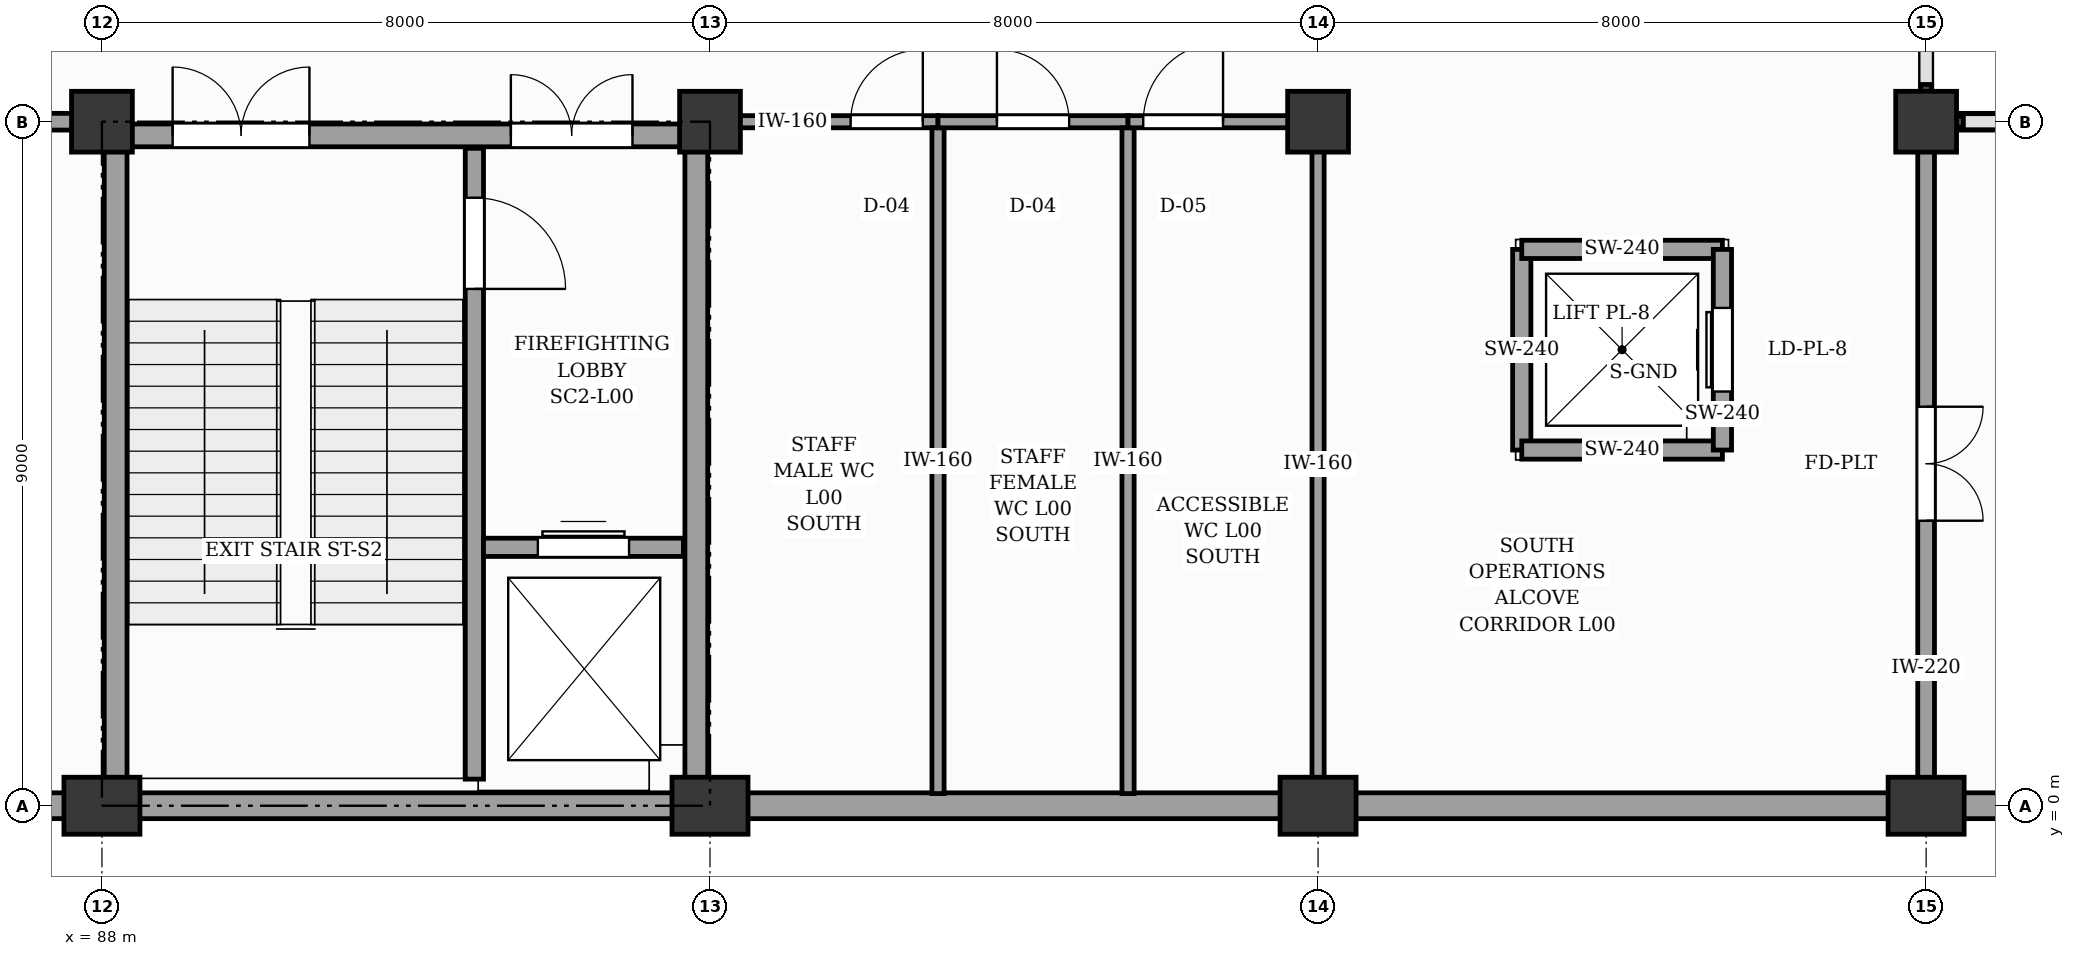
"""IFC4 building model, lengths in metres.
Left out: names, types, materials, properties, quantities, classifications, styles, units other than length and angle.
Written with IfcOpenShell. Run it as: python <this file> out.ifc"""

import sys

from ifc_helpers import new_model, si_unit, direction, frame, frame_2d, origin, origin_2d, place, context, subcontext, project, spatial, rectangle, extrude, element, fill, save


model = new_model("IFC4")
c1 = context("Model", 3, precision=1e-05, world=origin(), true_north=direction((0.0, 1.0)))
c2 = subcontext(c1, "Body", "Model", "MODEL_VIEW")
j1 = project(units=[si_unit("LENGTHUNIT", "METRE"), si_unit("PLANEANGLEUNIT", "RADIAN")], contexts=[c1])
p1 = place(None, origin())
s1 = spatial("IfcSite", under=j1, at=p1, CompositionType="ELEMENT")
p2 = place(p1, origin())
s2 = spatial("IfcBuilding", under=s1, at=p2, CompositionType="ELEMENT")
p3 = place(p2, origin())
s3 = spatial("IfcBuildingStorey", under=s2, at=p3, CompositionType="ELEMENT", Elevation=0.0)
p4 = place(p3, frame((88.0, 0.0, -0.3), z_axis=(0.0, 0.0, 1.0), x_axis=(1.0, 0.0, 0.0)))
e1 = element("IfcColumn", 1, at=p4, inside=s3, PredefinedType="PILASTER", context=c2, shape_type="SweptSolid", body=[
    extrude(rectangle(XDim=1.0, YDim=0.75, at=origin_2d()), origin(), (0.0, 0.0, 1.0), 5.1),
])
p5 = place(p3, frame((88.0, 9.0, -0.3), z_axis=(0.0, 0.0, 1.0), x_axis=(1.0, 0.0, 0.0)))
e2 = element("IfcColumn", 2, at=p5, inside=s3, PredefinedType="COLUMN", context=c2, shape_type="SweptSolid", body=[
    extrude(rectangle(XDim=0.8, YDim=0.8, at=origin_2d()), origin(), (0.0, 0.0, 1.0), 5.1),
])
p6 = place(p3, frame((96.0, 0.0, -0.3), z_axis=(0.0, 0.0, 1.0), x_axis=(1.0, 0.0, 0.0)))
e3 = element("IfcColumn", 3, at=p6, inside=s3, PredefinedType="PILASTER", context=c2, shape_type="SweptSolid", body=[
    extrude(rectangle(XDim=1.0, YDim=0.75, at=origin_2d()), origin(), (0.0, 0.0, 1.0), 5.1),
])
p7 = place(p3, frame((96.0, 9.0, -0.3), z_axis=(0.0, 0.0, 1.0), x_axis=(1.0, 0.0, 0.0)))
e4 = element("IfcColumn", 4, at=p7, inside=s3, PredefinedType="COLUMN", context=c2, shape_type="SweptSolid", body=[
    extrude(rectangle(XDim=0.8, YDim=0.8, at=origin_2d()), origin(), (0.0, 0.0, 1.0), 5.1),
])
p8 = place(p3, frame((104.0, 0.0, -0.3), z_axis=(0.0, 0.0, 1.0), x_axis=(1.0, 0.0, 0.0)))
e5 = element("IfcColumn", 5, at=p8, inside=s3, PredefinedType="PILASTER", context=c2, shape_type="SweptSolid", body=[
    extrude(rectangle(XDim=1.0, YDim=0.75, at=origin_2d()), origin(), (0.0, 0.0, 1.0), 5.1),
])
p9 = place(p3, frame((104.0, 9.0, -0.3), z_axis=(0.0, 0.0, 1.0), x_axis=(1.0, 0.0, 0.0)))
e6 = element("IfcColumn", 6, at=p9, inside=s3, PredefinedType="COLUMN", context=c2, shape_type="SweptSolid", body=[
    extrude(rectangle(XDim=0.8, YDim=0.8, at=origin_2d()), origin(), (0.0, 0.0, 1.0), 5.1),
])
p10 = place(p3, frame((112.0, 0.0, -0.3), z_axis=(0.0, 0.0, 1.0), x_axis=(1.0, 0.0, 0.0)))
e7 = element("IfcColumn", 7, at=p10, inside=s3, PredefinedType="PILASTER", context=c2, shape_type="SweptSolid", body=[
    extrude(rectangle(XDim=1.0, YDim=0.75, at=origin_2d()), origin(), (0.0, 0.0, 1.0), 5.1),
])
p11 = place(p3, frame((112.0, 9.0, -0.3), z_axis=(0.0, 0.0, 1.0), x_axis=(1.0, 0.0, 0.0)))
e8 = element("IfcColumn", 8, at=p11, inside=s3, PredefinedType="COLUMN", context=c2, shape_type="SweptSolid", body=[
    extrude(rectangle(XDim=0.8, YDim=0.8, at=origin_2d()), origin(), (0.0, 0.0, 1.0), 5.1),
])
for number, where, z_axis, x_axis in (
    (9, (80.4, 0.0, 0.0), (0.0, 0.0, 1.0), (1.0, 0.0, 0.0)),
    (10, (88.4, 0.0, 0.0), (0.0, 0.0, 1.0), (1.0, 0.0, 0.0)),
    (11, (96.4, 0.0, 0.0), (0.0, 0.0, 1.0), (1.0, 0.0, 0.0)),
    (12, (104.4, 0.0, 0.0), (0.0, 0.0, 1.0), (1.0, 0.0, 0.0)),
):
    element("IfcWall", number, at=place(p3, frame(where, z_axis=z_axis, x_axis=x_axis)), inside=s3, PredefinedType="SOLIDWALL", context=c2, shape_type="SweptSolid", body=[
        extrude(rectangle(XDim=7.2, YDim=0.34, at=frame_2d((3.6, 0.0))), origin(), (0.0, 0.0, 1.0), 3.81),
    ])
p12 = place(p3, frame((112.4, 0.0, 0.0), z_axis=(0.0, 0.0, 1.0), x_axis=(1.0, 0.0, 0.0)))
e13 = element("IfcWall", 13, at=p12, inside=s3, PredefinedType="SOLIDWALL", context=c2, shape_type="SweptSolid", body=[
    extrude(rectangle(XDim=7.2, YDim=0.34, at=frame_2d((3.6, 0.0))), origin(), (0.0, 0.0, 1.0), 3.03),
])
p13 = place(p3, frame((92.9, 0.35, 0.0), z_axis=(0.0, 0.0, 1.0), x_axis=(0.0, 1.0, 0.0)))
e14 = element("IfcWall", 14, at=p13, inside=s3, PredefinedType="SHEAR", context=c2, shape_type="SweptSolid", body=[
    extrude(rectangle(XDim=8.3, YDim=0.24, at=frame_2d((4.15, 0.0))), origin(), (0.0, 0.0, 1.0), 4.52),
])
p14 = place(p13, frame((6.45, 0.0, 0.0)))
e15 = element("IfcOpeningElement", 15, at=p14, cuts=e14, PredefinedType="OPENING", context=c2, shape_type="SweptSolid", body=[
    extrude(rectangle(XDim=1.2, YDim=2.15, at=frame_2d((0.6, 1.075))), frame((0.0, 0.13, 0.0), z_axis=(0.0, -1.0, 0.0), x_axis=(1.0, 0.0, 0.0)), (0.0, 0.0, 1.0), 0.26),
])
p15 = place(p3, frame((93.02, 3.4, 0.0), z_axis=(0.0, 0.0, 1.0), x_axis=(1.0, 0.0, 0.0)))
e16 = element("IfcWall", 16, at=p15, inside=s3, PredefinedType="SHEAR", context=c2, shape_type="SweptSolid", body=[
    extrude(rectangle(XDim=2.63, YDim=0.24, at=frame_2d((1.315, 0.0))), origin(), (0.0, 0.0, 1.0), 4.52),
])
p16 = place(p15, frame((0.715, 0.0, 0.0)))
e17 = element("IfcOpeningElement", 17, at=p16, cuts=e16, PredefinedType="OPENING", context=c2, shape_type="SweptSolid", body=[
    extrude(rectangle(XDim=1.2, YDim=2.15, at=frame_2d((0.6, 1.075))), frame((0.0, 0.13, 0.0), z_axis=(0.0, -1.0, 0.0), x_axis=(1.0, 0.0, 0.0)), (0.0, 0.0, 1.0), 0.26),
])
for number, where, z_axis, x_axis in (
    (18, (88.18, 0.18, 0.0), (0.0, 0.0, 1.0), (0.0, 1.0, 0.0)),
    (19, (95.82, 0.18, 0.0), (0.0, 0.0, 1.0), (0.0, 1.0, 0.0)),
):
    element("IfcWall", number, at=place(p3, frame(where, z_axis=z_axis, x_axis=x_axis)), inside=s3, PredefinedType="SHEAR", context=c2, shape_type="SweptSolid", body=[
        extrude(rectangle(XDim=8.64, YDim=0.3, at=frame_2d((4.32, 0.0))), origin(), (0.0, 0.0, 1.0), 4.52),
    ])
p17 = place(p3, frame((88.03, 8.82, 0.0), z_axis=(0.0, 0.0, 1.0), x_axis=(1.0, 0.0, 0.0)))
e20 = element("IfcWall", 20, at=p17, inside=s3, PredefinedType="SHEAR", context=c2, shape_type="SweptSolid", body=[
    extrude(rectangle(XDim=7.94, YDim=0.3, at=frame_2d((3.97, 0.0))), origin(), (0.0, 0.0, 1.0), 4.52),
])
p18 = place(p17, frame((5.35, 0.0, 0.0)))
e21 = element("IfcOpeningElement", 21, at=p18, cuts=e20, PredefinedType="OPENING", context=c2, shape_type="SweptSolid", body=[
    extrude(rectangle(XDim=1.6, YDim=2.15, at=frame_2d((0.8, 1.075))), frame((0.0, 0.16, 0.0), z_axis=(0.0, -1.0, 0.0), x_axis=(1.0, 0.0, 0.0)), (0.0, 0.0, 1.0), 0.32),
])
p19 = place(p17, frame((0.9, 0.0, 0.0)))
e22 = element("IfcOpeningElement", 22, at=p19, cuts=e20, PredefinedType="OPENING", context=c2, shape_type="SweptSolid", body=[
    extrude(rectangle(XDim=1.8, YDim=2.2, at=frame_2d((0.9, 1.1))), frame((0.0, 0.16, 0.0), z_axis=(0.0, -1.0, 0.0), x_axis=(1.0, 0.0, 0.0)), (0.0, 0.0, 1.0), 0.32),
])
for number, where, z_axis, x_axis in (
    (23, (106.68, 4.68, 0.0), (0.0, 0.0, 1.0), (0.0, 1.0, 0.0)),
    (24, (106.68, 4.68, 0.0), (0.0, 0.0, 1.0), (1.0, 0.0, 0.0)),
    (25, (106.68, 7.32, 0.0), (0.0, 0.0, 1.0), (1.0, 0.0, 0.0)),
):
    element("IfcWall", number, at=place(p3, frame(where, z_axis=z_axis, x_axis=x_axis)), inside=s3, PredefinedType="SHEAR", context=c2, shape_type="SweptSolid", body=[
        extrude(rectangle(XDim=2.64, YDim=0.24, at=frame_2d((1.32, 0.0))), origin(), (0.0, 0.0, 1.0), 4.55),
    ])
p20 = place(p3, frame((109.32, 4.68, 0.0), z_axis=(0.0, 0.0, 1.0), x_axis=(0.0, 1.0, 0.0)))
e26 = element("IfcWall", 26, at=p20, inside=s3, PredefinedType="SHEAR", context=c2, shape_type="SweptSolid", body=[
    extrude(rectangle(XDim=2.64, YDim=0.24, at=frame_2d((1.32, 0.0))), origin(), (0.0, 0.0, 1.0), 4.55),
])
p21 = place(p20, frame((0.77, 0.0, 0.0)))
e27 = element("IfcOpeningElement", 27, at=p21, cuts=e26, PredefinedType="OPENING", context=c2, shape_type="SweptSolid", body=[
    extrude(rectangle(XDim=1.1, YDim=2.15, at=frame_2d((0.55, 1.075))), frame((0.0, 0.13, 0.0), z_axis=(0.0, -1.0, 0.0), x_axis=(1.0, 0.0, 0.0)), (0.0, 0.0, 1.0), 0.26),
])
p22 = place(p3, frame((80.3, 9.0, 0.0), z_axis=(0.0, 0.0, 1.0), x_axis=(1.0, 0.0, 0.0)))
e28 = element("IfcWall", 28, at=p22, inside=s3, PredefinedType="SOLIDWALL", context=c2, shape_type="SweptSolid", body=[
    extrude(rectangle(XDim=7.4, YDim=0.22, at=frame_2d((3.7, 0.0))), origin(), (0.0, 0.0, 1.0), 3.56),
])
p23 = place(p22, frame((2.95, 0.0, 0.0)))
e29 = element("IfcOpeningElement", 29, at=p23, cuts=e28, PredefinedType="OPENING", context=c2, shape_type="SweptSolid", body=[
    extrude(rectangle(XDim=1.5, YDim=2.2, at=frame_2d((0.75, 1.1))), frame((0.0, 0.12, 0.0), z_axis=(0.0, -1.0, 0.0), x_axis=(1.0, 0.0, 0.0)), (0.0, 0.0, 1.0), 0.24),
])
p24 = place(p3, frame((96.3, 9.0, 0.0), z_axis=(0.0, 0.0, 1.0), x_axis=(1.0, 0.0, 0.0)))
e30 = element("IfcWall", 30, at=p24, inside=s3, PredefinedType="PARTITIONING", context=c2, shape_type="SweptSolid", body=[
    extrude(rectangle(XDim=2.7, YDim=0.16, at=frame_2d((1.35, 0.0))), origin(), (0.0, 0.0, 1.0), 3.56),
])
p25 = place(p24, frame((1.55, 0.0, 0.0)))
e31 = element("IfcOpeningElement", 31, at=p25, cuts=e30, PredefinedType="OPENING", context=c2, shape_type="SweptSolid", body=[
    extrude(rectangle(XDim=0.95, YDim=2.1, at=frame_2d((0.475, 1.05))), frame((0.0, 0.09, 0.0), z_axis=(0.0, -1.0, 0.0), x_axis=(1.0, 0.0, 0.0)), (0.0, 0.0, 1.0), 0.18),
])
p26 = place(p3, frame((99.0, 0.16, 0.0), z_axis=(0.0, 0.0, 1.0), x_axis=(0.0, 1.0, 0.0)))
e32 = element("IfcWall", 32, at=p26, inside=s3, PredefinedType="PARTITIONING", context=c2, shape_type="SweptSolid", body=[
    extrude(rectangle(XDim=8.76, YDim=0.16, at=frame_2d((4.38, 0.0))), origin(), (0.0, 0.0, 1.0), 3.56),
])
p27 = place(p3, frame((99.0, 9.0, 0.0), z_axis=(0.0, 0.0, 1.0), x_axis=(1.0, 0.0, 0.0)))
e33 = element("IfcWall", 33, at=p27, inside=s3, PredefinedType="PARTITIONING", context=c2, shape_type="SweptSolid", body=[
    extrude(rectangle(XDim=2.5, YDim=0.16, at=frame_2d((1.25, 0.0))), origin(), (0.0, 0.0, 1.0), 3.56),
])
p28 = place(p27, frame((0.775, 0.0, 0.0)))
e34 = element("IfcOpeningElement", 34, at=p28, cuts=e33, PredefinedType="OPENING", context=c2, shape_type="SweptSolid", body=[
    extrude(rectangle(XDim=0.95, YDim=2.1, at=frame_2d((0.475, 1.05))), frame((0.0, 0.09, 0.0), z_axis=(0.0, -1.0, 0.0), x_axis=(1.0, 0.0, 0.0)), (0.0, 0.0, 1.0), 0.18),
])
p29 = place(p3, frame((101.5, 0.16, 0.0), z_axis=(0.0, 0.0, 1.0), x_axis=(0.0, 1.0, 0.0)))
e35 = element("IfcWall", 35, at=p29, inside=s3, PredefinedType="PARTITIONING", context=c2, shape_type="SweptSolid", body=[
    extrude(rectangle(XDim=8.76, YDim=0.16, at=frame_2d((4.38, 0.0))), origin(), (0.0, 0.0, 1.0), 3.56),
])
p30 = place(p3, frame((101.5, 9.0, 0.0), z_axis=(0.0, 0.0, 1.0), x_axis=(1.0, 0.0, 0.0)))
e36 = element("IfcWall", 36, at=p30, inside=s3, PredefinedType="PARTITIONING", context=c2, shape_type="SweptSolid", body=[
    extrude(rectangle(XDim=2.2, YDim=0.16, at=frame_2d((1.1, 0.0))), origin(), (0.0, 0.0, 1.0), 3.56),
])
p31 = place(p30, frame((0.2, 0.0, 0.0)))
e37 = element("IfcOpeningElement", 37, at=p31, cuts=e36, PredefinedType="OPENING", context=c2, shape_type="SweptSolid", body=[
    extrude(rectangle(XDim=1.05, YDim=2.1, at=frame_2d((0.525, 1.05))), frame((0.0, 0.09, 0.0), z_axis=(0.0, -1.0, 0.0), x_axis=(1.0, 0.0, 0.0)), (0.0, 0.0, 1.0), 0.18),
])
p32 = place(p3, frame((104.0, 0.3, 0.0), z_axis=(0.0, 0.0, 1.0), x_axis=(0.0, 1.0, 0.0)))
e38 = element("IfcWall", 38, at=p32, inside=s3, PredefinedType="PARTITIONING", context=c2, shape_type="SweptSolid", body=[
    extrude(rectangle(XDim=8.4, YDim=0.16, at=frame_2d((4.2, 0.0))), origin(), (0.0, 0.0, 1.0), 3.56),
])
p33 = place(p3, frame((112.3, 9.0, 0.0), z_axis=(0.0, 0.0, 1.0), x_axis=(1.0, 0.0, 0.0)))
e39 = element("IfcWall", 39, at=p33, inside=s3, PredefinedType="SOLIDWALL", context=c2, shape_type="SweptSolid", body=[
    extrude(rectangle(XDim=7.4, YDim=0.22, at=frame_2d((3.7, 0.0))), origin(), (0.0, 0.0, 1.0), 2.73),
])
p34 = place(p33, frame((2.95, 0.0, 0.0)))
e40 = element("IfcOpeningElement", 40, at=p34, cuts=e39, PredefinedType="OPENING", context=c2, shape_type="SweptSolid", body=[
    extrude(rectangle(XDim=1.5, YDim=2.2, at=frame_2d((0.75, 1.1))), frame((0.0, 0.12, 0.0), z_axis=(0.0, -1.0, 0.0), x_axis=(1.0, 0.0, 0.0)), (0.0, 0.0, 1.0), 0.24),
])
p35 = place(p3, frame((112.0, 0.3, 0.0), z_axis=(0.0, 0.0, 1.0), x_axis=(0.0, 1.0, 0.0)))
e41 = element("IfcWall", 41, at=p35, inside=s3, PredefinedType="SOLIDWALL", context=c2, shape_type="SweptSolid", body=[
    extrude(rectangle(XDim=8.4, YDim=0.22, at=frame_2d((4.2, 0.0))), origin(), (0.0, 0.0, 1.0), 3.56),
])
p36 = place(p35, frame((3.45, 0.0, 0.0)))
e42 = element("IfcOpeningElement", 42, at=p36, cuts=e41, PredefinedType="OPENING", context=c2, shape_type="SweptSolid", body=[
    extrude(rectangle(XDim=1.5, YDim=2.2, at=frame_2d((0.75, 1.1))), frame((0.0, 0.12, 0.0), z_axis=(0.0, -1.0, 0.0), x_axis=(1.0, 0.0, 0.0)), (0.0, 0.0, 1.0), 0.24),
])
p37 = place(p14, frame((1.2, 0.0, 0.0), z_axis=(0.0, 0.0, 1.0), x_axis=(-1.0, 0.0, 0.0)))
e43 = element("IfcDoor", 43, at=p37, inside=s3, OperationType="SINGLE_SWING_LEFT", PredefinedType="DOOR", context=c2, shape_type="SweptSolid", body=[
    extrude(rectangle(XDim=1.2, YDim=2.15, at=frame_2d((0.6, 1.075))), frame((0.0, 0.025, 0.0), z_axis=(0.0, -1.0, 0.0), x_axis=(1.0, 0.0, 0.0)), (0.0, 0.0, 1.0), 0.05),
])
fill(e15, e43)
p38 = place(p16, origin())
e44 = element("IfcDoor", 44, at=p38, inside=s3, OperationType="DOUBLE_DOOR_SLIDING", PredefinedType="DOOR", context=c2, shape_type="SweptSolid", body=[
    extrude(rectangle(XDim=1.2, YDim=2.15, at=frame_2d((0.6, 1.075))), frame((0.0, 0.025, 0.0), z_axis=(0.0, -1.0, 0.0), x_axis=(1.0, 0.0, 0.0)), (0.0, 0.0, 1.0), 0.05),
])
fill(e17, e44)
p39 = place(p18, origin())
e45 = element("IfcDoor", 45, at=p39, inside=s3, OperationType="DOUBLE_DOOR_SINGLE_SWING", PredefinedType="DOOR", context=c2, shape_type="SweptSolid", body=[
    extrude(rectangle(XDim=1.6, YDim=2.15, at=frame_2d((0.8, 1.075))), frame((0.0, 0.025, 0.0), z_axis=(0.0, -1.0, 0.0), x_axis=(1.0, 0.0, 0.0)), (0.0, 0.0, 1.0), 0.05),
])
fill(e21, e45)
p40 = place(p19, origin())
e46 = element("IfcDoor", 46, at=p40, inside=s3, OperationType="DOUBLE_DOOR_SINGLE_SWING", PredefinedType="DOOR", context=c2, shape_type="SweptSolid", body=[
    extrude(rectangle(XDim=1.8, YDim=2.2, at=frame_2d((0.9, 1.1))), frame((0.0, 0.025, 0.0), z_axis=(0.0, -1.0, 0.0), x_axis=(1.0, 0.0, 0.0)), (0.0, 0.0, 1.0), 0.05),
])
fill(e22, e46)
p41 = place(p21, origin())
e47 = element("IfcDoor", 47, at=p41, inside=s3, OperationType="DOUBLE_DOOR_SLIDING", PredefinedType="DOOR", context=c2, shape_type="SweptSolid", body=[
    extrude(rectangle(XDim=1.1, YDim=2.15, at=frame_2d((0.55, 1.075))), frame((0.0, 0.025, 0.0), z_axis=(0.0, -1.0, 0.0), x_axis=(1.0, 0.0, 0.0)), (0.0, 0.0, 1.0), 0.05),
])
fill(e27, e47)
p42 = place(p25, origin())
e48 = element("IfcDoor", 48, at=p42, inside=s3, OperationType="SINGLE_SWING_RIGHT", PredefinedType="DOOR", context=c2, shape_type="SweptSolid", body=[
    extrude(rectangle(XDim=0.95, YDim=2.1, at=frame_2d((0.475, 1.05))), frame((0.0, 0.025, 0.0), z_axis=(0.0, -1.0, 0.0), x_axis=(1.0, 0.0, 0.0)), (0.0, 0.0, 1.0), 0.05),
])
fill(e31, e48)
p43 = place(p28, origin())
e49 = element("IfcDoor", 49, at=p43, inside=s3, OperationType="SINGLE_SWING_LEFT", PredefinedType="DOOR", context=c2, shape_type="SweptSolid", body=[
    extrude(rectangle(XDim=0.95, YDim=2.1, at=frame_2d((0.475, 1.05))), frame((0.0, 0.025, 0.0), z_axis=(0.0, -1.0, 0.0), x_axis=(1.0, 0.0, 0.0)), (0.0, 0.0, 1.0), 0.05),
])
fill(e34, e49)
p44 = place(p31, origin())
e50 = element("IfcDoor", 50, at=p44, inside=s3, OperationType="SINGLE_SWING_RIGHT", PredefinedType="DOOR", context=c2, shape_type="SweptSolid", body=[
    extrude(rectangle(XDim=1.05, YDim=2.1, at=frame_2d((0.525, 1.05))), frame((0.0, 0.025, 0.0), z_axis=(0.0, -1.0, 0.0), x_axis=(1.0, 0.0, 0.0)), (0.0, 0.0, 1.0), 0.05),
])
fill(e37, e50)
p45 = place(p36, frame((1.5, 0.0, 0.0), z_axis=(0.0, 0.0, 1.0), x_axis=(-1.0, 0.0, 0.0)))
e51 = element("IfcDoor", 51, at=p45, inside=s3, OperationType="DOUBLE_DOOR_SINGLE_SWING", PredefinedType="DOOR", context=c2, shape_type="SweptSolid", body=[
    extrude(rectangle(XDim=1.5, YDim=2.2, at=frame_2d((0.75, 1.1))), frame((0.0, 0.025, 0.0), z_axis=(0.0, -1.0, 0.0), x_axis=(1.0, 0.0, 0.0)), (0.0, 0.0, 1.0), 0.05),
])
fill(e42, e51)
save(model, sys.argv[1])
